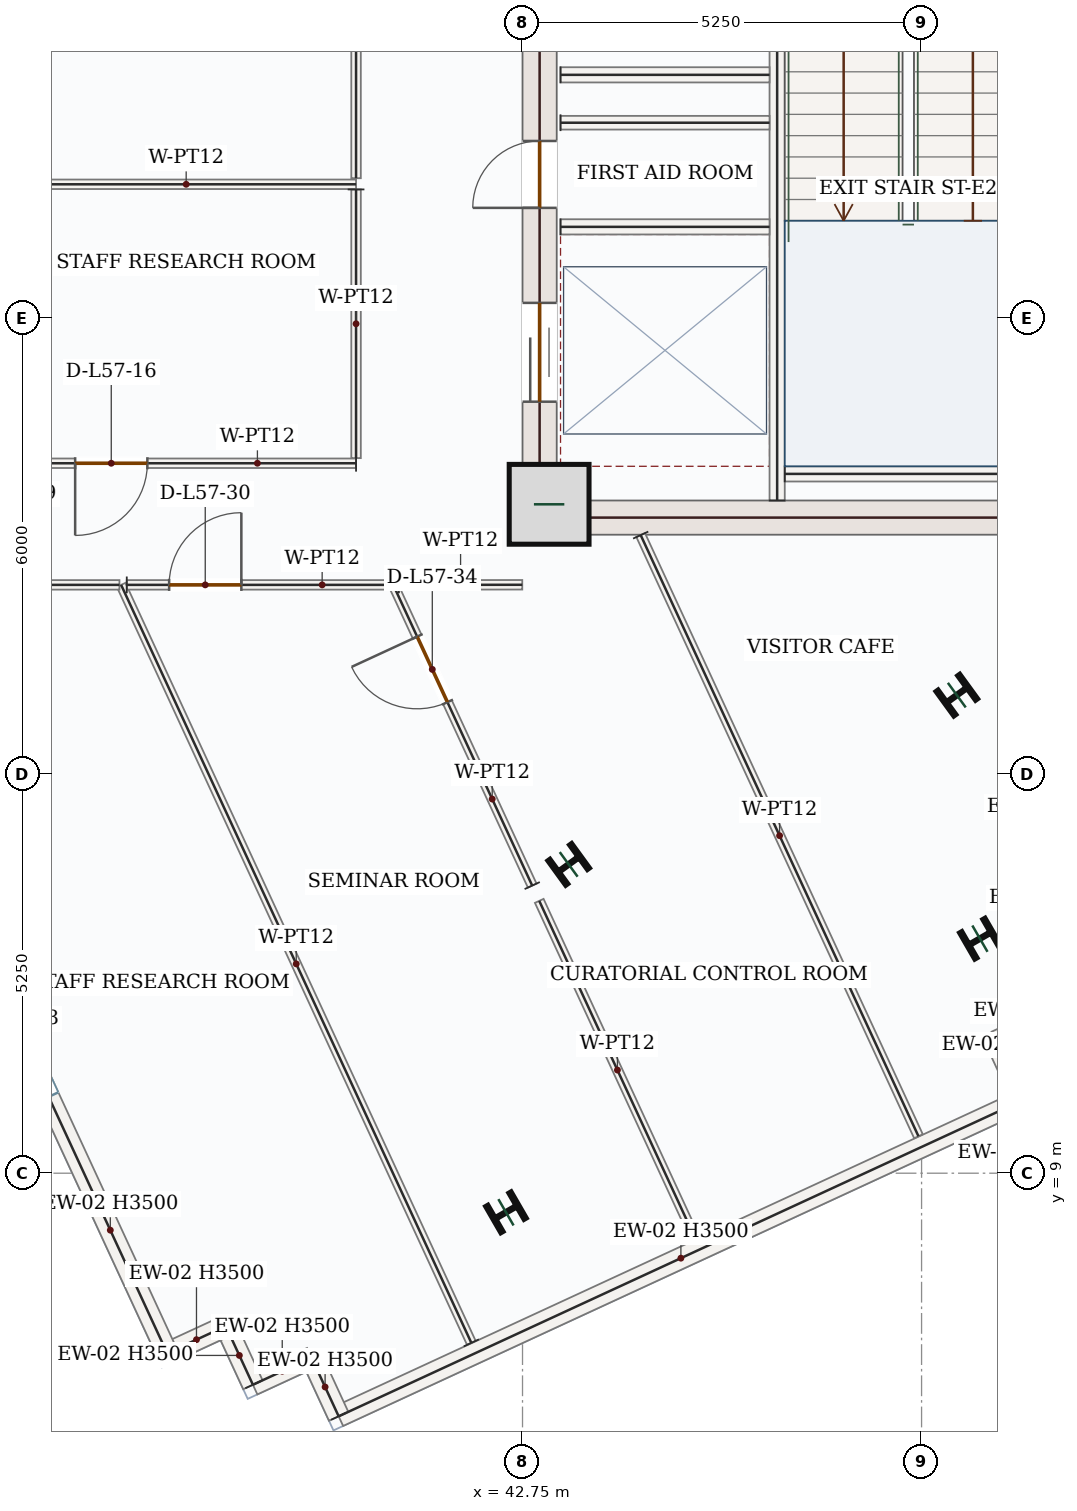
"""IFC4 building model, lengths in metres.
Left out: names, types, materials, properties, quantities, classifications, styles, units other than length and angle.
Written with IfcOpenShell. Run it as: python <this file> out.ifc"""

import sys

from ifc_helpers import new_model, si_unit, direction, frame, frame_2d, origin, origin_2d, place, context, subcontext, project, spatial, rectangle, i_section, extrude, source, transform, mapped, element, fill, save


model = new_model("IFC4")
c1 = context("Model", 3, precision=1e-05, world=origin(), true_north=direction((0.0, 1.0)))
c2 = subcontext(c1, "Body", "Model", "MODEL_VIEW")
j1 = project(units=[si_unit("LENGTHUNIT", "METRE"), si_unit("PLANEANGLEUNIT", "RADIAN")], contexts=[c1])
p1 = place(None, origin())
s1 = spatial("IfcSite", under=j1, at=p1, CompositionType="ELEMENT")
p2 = place(p1, origin())
s2 = spatial("IfcBuilding", under=s1, at=p2, CompositionType="ELEMENT")
p3 = place(p2, frame((0.0, 0.0, 242.85)))
s3 = spatial("IfcBuildingStorey", under=s2, at=p3, CompositionType="ELEMENT", Elevation=242.85)
p4 = place(p3, frame((42.975, 17.4, 0.0), z_axis=(0.0, 0.0, 1.0), x_axis=(0.0, 1.0, 0.0)))
e1 = element("IfcWall", 1, at=p4, inside=s3, PredefinedType="SHEAR", context=c2, shape_type="SweptSolid", body=[
    extrude(rectangle(XDim=8.55, YDim=0.45, at=frame_2d((4.275, 0.0))), origin(), (0.0, 0.0, 1.0), 3.5),
])
p5 = place(p4, frame((6.65, 0.0, 0.0)))
e2 = element("IfcOpeningElement", 2, at=p5, cuts=e1, PredefinedType="OPENING", context=c2, shape_type="SweptSolid", body=[
    extrude(rectangle(XDim=1.1, YDim=2.2, at=frame_2d((0.55, 1.1))), frame((0.0, 0.235, 0.0), z_axis=(0.0, -1.0, 0.0), x_axis=(1.0, 0.0, 0.0)), (0.0, 0.0, 1.0), 0.47),
])
p6 = place(p4, frame((1.75, 0.0, 0.0)))
e3 = element("IfcOpeningElement", 3, at=p6, cuts=e1, PredefinedType="OPENING", context=c2, shape_type="SweptSolid", body=[
    extrude(rectangle(XDim=1.3, YDim=2.2, at=frame_2d((0.65, 1.1))), frame((0.0, 0.235, 0.0), z_axis=(0.0, -1.0, 0.0), x_axis=(1.0, 0.0, 0.0)), (0.0, 0.0, 1.0), 0.47),
])
p7 = place(p4, frame((4.3, 0.0, 0.0)))
e4 = element("IfcOpeningElement", 4, at=p7, cuts=e1, PredefinedType="OPENING", context=c2, shape_type="SweptSolid", body=[
    extrude(rectangle(XDim=0.88, YDim=2.1, at=frame_2d((0.44, 1.05))), frame((0.0, 0.235, 0.0), z_axis=(0.0, -1.0, 0.0), x_axis=(1.0, 0.0, 0.0)), (0.0, 0.0, 1.0), 0.47),
])
m1 = source(origin(), c2, "Body", "SweptSolid", [
    extrude(rectangle(XDim=7.1, YDim=0.45, at=frame_2d((3.55, 0.0))), origin(), (0.0, 0.0, 1.0), 3.5),
])
p8 = place(p3, frame((43.2, 17.625, 0.0), z_axis=(0.0, 0.0, 1.0), x_axis=(1.0, 0.0, 0.0)))
e5 = element("IfcWall", 5, at=p8, inside=s3, PredefinedType="SHEAR", context=c2, shape_type="MappedRepresentation", body=[
    mapped(m1, transform((0.0, 0.0, 0.0), x_axis=(1.0, 0.0, 0.0), y_axis=(0.0, 1.0, 0.0), z_axis=(0.0, 0.0, 1.0), scale=1.0)),
])
m2 = source(origin(), c2, "Body", "SweptSolid", [
    extrude(rectangle(XDim=1.05, YDim=1.05, at=origin_2d()), origin(), (0.0, 0.0, 1.0), 3.75),
])
p9 = place(p3, frame((43.1, 17.8, 0.0), z_axis=(0.0, 0.0, 1.0), x_axis=(1.0, 0.0, 0.0)))
e6 = element("IfcColumn", 6, at=p9, inside=s3, PredefinedType="COLUMN", context=c2, shape_type="MappedRepresentation", body=[
    mapped(m2, transform((0.0, 0.0, 0.0), x_axis=(1.0, 0.0, 0.0), y_axis=(0.0, 1.0, 0.0), z_axis=(0.0, 0.0, 1.0), scale=1.0)),
])
m3 = source(origin(), c2, "Body", "SweptSolid", [
    extrude(i_section(OverallWidth=0.399, OverallDepth=0.386, WebThickness=0.021, FlangeThickness=0.033, FilletRadius=0.018, at=origin_2d()), origin(), (0.0, 0.0, 1.0), 3.75),
])
for number, where, z_axis, x_axis in (
    (7, (43.357, 13.063, 0.0), (0.0, 0.0, 1.0), (-0.588, 0.809, 0.0)),
    (8, (48.464, 15.289, 0.0), (0.0, 0.0, 1.0), (-0.588, 0.809, 0.0)),
    (9, (42.532, 8.486, 0.0), (0.0, 0.0, 1.0), (-0.5, 0.866, 0.0)),
    (10, (48.768, 12.086, 0.0), (0.0, 0.0, 1.0), (-0.5, 0.866, 0.0)),
):
    element("IfcColumn", number, at=place(p3, frame(where, z_axis=z_axis, x_axis=x_axis)), inside=s3, PredefinedType="COLUMN", context=c2, shape_type="MappedRepresentation", body=[
        mapped(m3, transform((0.0, 0.0, 0.0), x_axis=(1.0, 0.0, 0.0), y_axis=(0.0, 1.0, 0.0), z_axis=(0.0, 0.0, 1.0), scale=1.0)),
    ])
m4 = source(origin(), c2, "Body", "SweptSolid", [
    extrude(rectangle(XDim=0.85, YDim=0.28, at=frame_2d((0.425, 0.0))), origin(), (0.0, 0.0, 1.0), 3.5),
])
p10 = place(p3, frame((49.751, 11.091, 0.0), z_axis=(0.0, 0.0, 1.0), x_axis=(-0.907791150023, -0.419422493365, 0.0)))
e11 = element("IfcWall", 11, at=p10, inside=s3, PredefinedType="SOLIDWALL", context=c2, shape_type="MappedRepresentation", body=[
    mapped(m4, transform((0.0, 0.0, 0.0), x_axis=(1.0, 0.0, 0.0), y_axis=(0.0, 1.0, 0.0), z_axis=(0.0, 0.0, 1.0), scale=1.0)),
])
m5 = source(origin(), c2, "Body", "SweptSolid", [
    extrude(rectangle(XDim=0.85, YDim=0.28, at=frame_2d((0.425, 0.0))), origin(), (0.0, 0.0, 1.0), 3.5),
])
p11 = place(p3, frame((48.98, 10.734, 0.0), z_axis=(0.0, 0.0, 1.0), x_axis=(0.419313139191, -0.907841666427, 0.0)))
e12 = element("IfcWall", 12, at=p11, inside=s3, PredefinedType="SOLIDWALL", context=c2, shape_type="MappedRepresentation", body=[
    mapped(m5, transform((0.0, 0.0, 0.0), x_axis=(1.0, 0.0, 0.0), y_axis=(0.0, 1.0, 0.0), z_axis=(0.0, 0.0, 1.0), scale=1.0)),
])
m6 = source(origin(), c2, "Body", "SweptSolid", [
    extrude(rectangle(XDim=9.92, YDim=0.28, at=frame_2d((4.96, 0.0))), origin(), (0.0, 0.0, 1.0), 3.5),
])
p12 = place(p3, frame((49.336, 9.963, 0.0), z_axis=(0.0, 0.0, 1.0), x_axis=(-0.907779940536, -0.419446754143, 0.0)))
e13 = element("IfcWall", 13, at=p12, inside=s3, PredefinedType="SOLIDWALL", context=c2, shape_type="MappedRepresentation", body=[
    mapped(m6, transform((0.0, 0.0, 0.0), x_axis=(1.0, 0.0, 0.0), y_axis=(0.0, 1.0, 0.0), z_axis=(0.0, 0.0, 1.0), scale=1.0)),
])
p13 = place(p3, frame((40.331, 5.802, 0.0), z_axis=(0.0, 0.0, 1.0), x_axis=(-0.419422493365, 0.907791150023, 0.0)))
e14 = element("IfcWall", 14, at=p13, inside=s3, PredefinedType="SOLIDWALL", context=c2, shape_type="MappedRepresentation", body=[
    mapped(m4, transform((0.0, 0.0, 0.0), x_axis=(1.0, 0.0, 0.0), y_axis=(0.0, 1.0, 0.0), z_axis=(0.0, 0.0, 1.0), scale=1.0)),
])
p14 = place(p3, frame((39.975, 6.573, 0.0), z_axis=(0.0, 0.0, 1.0), x_axis=(-0.907841666427, -0.419313139191, 0.0)))
e15 = element("IfcWall", 15, at=p14, inside=s3, PredefinedType="SOLIDWALL", context=c2, shape_type="MappedRepresentation", body=[
    mapped(m5, transform((0.0, 0.0, 0.0), x_axis=(1.0, 0.0, 0.0), y_axis=(0.0, 1.0, 0.0), z_axis=(0.0, 0.0, 1.0), scale=1.0)),
])
p15 = place(p3, frame((39.203, 6.217, 0.0), z_axis=(0.0, 0.0, 1.0), x_axis=(-0.419422493365, 0.907791150023, 0.0)))
e16 = element("IfcWall", 16, at=p15, inside=s3, PredefinedType="SOLIDWALL", context=c2, shape_type="MappedRepresentation", body=[
    mapped(m4, transform((0.0, 0.0, 0.0), x_axis=(1.0, 0.0, 0.0), y_axis=(0.0, 1.0, 0.0), z_axis=(0.0, 0.0, 1.0), scale=1.0)),
])
p16 = place(p3, frame((38.846, 6.988, 0.0), z_axis=(0.0, 0.0, 1.0), x_axis=(-0.907841666427, -0.419313139191, 0.0)))
e17 = element("IfcWall", 17, at=p16, inside=s3, PredefinedType="SOLIDWALL", context=c2, shape_type="MappedRepresentation", body=[
    mapped(m5, transform((0.0, 0.0, 0.0), x_axis=(1.0, 0.0, 0.0), y_axis=(0.0, 1.0, 0.0), z_axis=(0.0, 0.0, 1.0), scale=1.0)),
])
p17 = place(p3, frame((38.075, 6.632, 0.0), z_axis=(0.0, 0.0, 1.0), x_axis=(-0.419437747849, 0.90778410191, 0.0)))
e18 = element("IfcWall", 18, at=p17, inside=s3, PredefinedType="SOLIDWALL", context=c2, shape_type="SweptSolid", body=[
    extrude(rectangle(XDim=8.932, YDim=0.28, at=frame_2d((4.466, 0.0))), origin(), (0.0, 0.0, 1.0), 3.5),
])
p18 = place(p17, frame((3.716, 0.0, 0.85)))
e19 = element("IfcOpeningElement", 19, at=p18, cuts=e18, PredefinedType="OPENING", context=c2, shape_type="SweptSolid", body=[
    extrude(rectangle(XDim=1.5, YDim=1.5, at=frame_2d((0.75, 0.75))), frame((0.0, 0.15, 0.0), z_axis=(0.0, -1.0, 0.0), x_axis=(1.0, 0.0, 0.0)), (0.0, 0.0, 1.0), 0.3),
])
p19 = place(p3, frame((46.1, 17.85, 0.0), z_axis=(0.0, 0.0, 1.0), x_axis=(0.0, 1.0, 0.0)))
e20 = element("IfcWall", 20, at=p19, inside=s3, PredefinedType="SOLIDWALL", context=c2, shape_type="SweptSolid", body=[
    extrude(rectangle(XDim=8.0, YDim=0.2, at=frame_2d((4.0, 0.0))), origin(), (0.0, 0.0, 1.0), 3.5),
])
p20 = place(p19, frame((6.3, 0.0, 0.0)))
e21 = element("IfcOpeningElement", 21, at=p20, cuts=e20, PredefinedType="OPENING", context=c2, shape_type="SweptSolid", body=[
    extrude(rectangle(XDim=1.05, YDim=2.15, at=frame_2d((0.525, 1.075))), frame((0.0, 0.11, 0.0), z_axis=(0.0, -1.0, 0.0), x_axis=(1.0, 0.0, 0.0)), (0.0, 0.0, 1.0), 0.22),
])
m7 = source(origin(), c2, "Body", "SweptSolid", [
    extrude(rectangle(XDim=3.25, YDim=0.2, at=frame_2d((1.625, 0.0))), origin(), (0.0, 0.0, 1.0), 3.5),
])
p21 = place(p3, frame((46.2, 18.2, 0.0), z_axis=(0.0, 0.0, 1.0), x_axis=(1.0, 0.0, 0.0)))
e22 = element("IfcWall", 22, at=p21, inside=s3, PredefinedType="SOLIDWALL", context=c2, shape_type="MappedRepresentation", body=[
    mapped(m7, transform((0.0, 0.0, 0.0), x_axis=(1.0, 0.0, 0.0), y_axis=(0.0, 1.0, 0.0), z_axis=(0.0, 0.0, 1.0), scale=1.0)),
])
m8 = source(origin(), c2, "Body", "SweptSolid", [
    extrude(rectangle(XDim=2.75, YDim=0.2, at=frame_2d((1.375, 0.0))), origin(), (0.0, 0.0, 1.0), 3.5),
])
for number, where, z_axis, x_axis in (
    (23, (43.25, 23.45, 0.0), (0.0, 0.0, 1.0), (1.0, 0.0, 0.0)),
    (24, (43.25, 21.45, 0.0), (0.0, 0.0, 1.0), (1.0, 0.0, 0.0)),
):
    element("IfcWall", number, at=place(p3, frame(where, z_axis=z_axis, x_axis=x_axis)), inside=s3, PredefinedType="SOLIDWALL", context=c2, shape_type="MappedRepresentation", body=[
        mapped(m8, transform((0.0, 0.0, 0.0), x_axis=(1.0, 0.0, 0.0), y_axis=(0.0, 1.0, 0.0), z_axis=(0.0, 0.0, 1.0), scale=1.0)),
    ])
m9 = source(origin(), c2, "Body", "SweptSolid", [
    extrude(rectangle(XDim=2.75, YDim=0.18, at=frame_2d((1.375, 0.0))), origin(), (0.0, 0.0, 1.0), 3.5),
])
p22 = place(p3, frame((43.25, 22.82, 0.0), z_axis=(0.0, 0.0, 1.0), x_axis=(1.0, 0.0, 0.0)))
e25 = element("IfcWall", 25, at=p22, inside=s3, PredefinedType="PARTITIONING", context=c2, shape_type="MappedRepresentation", body=[
    mapped(m9, transform((0.0, 0.0, 0.0), x_axis=(1.0, 0.0, 0.0), y_axis=(0.0, 1.0, 0.0), z_axis=(0.0, 0.0, 1.0), scale=1.0)),
])
p23 = place(p3, frame((40.56, 18.34, 0.0), z_axis=(0.0, 0.0, 1.0), x_axis=(-1.0, 0.0, 0.0)))
e26 = element("IfcWall", 26, at=p23, inside=s3, PredefinedType="PARTITIONING", context=c2, shape_type="SweptSolid", body=[
    extrude(rectangle(XDim=4.47, YDim=0.125, at=frame_2d((2.235, 0.0))), origin(), (0.0, 0.0, 1.0), 3.5),
])
p24 = place(p23, frame((2.746, 0.0, 0.0)))
e27 = element("IfcOpeningElement", 27, at=p24, cuts=e26, PredefinedType="OPENING", context=c2, shape_type="SweptSolid", body=[
    extrude(rectangle(XDim=0.95, YDim=2.15, at=frame_2d((0.475, 1.075))), frame((0.0, 0.073, 0.0), z_axis=(0.0, -1.0, 0.0), x_axis=(1.0, 0.0, 0.0)), (0.0, 0.0, 1.0), 0.145),
])
m10 = source(origin(), c2, "Body", "SweptSolid", [
    extrude(rectangle(XDim=4.47, YDim=0.125, at=frame_2d((2.235, 0.0))), origin(), (0.0, 0.0, 1.0), 3.5),
])
p25 = place(p3, frame((36.09, 22.01, 0.0), z_axis=(0.0, 0.0, 1.0), x_axis=(1.0, 0.0, 0.0)))
e28 = element("IfcWall", 28, at=p25, inside=s3, PredefinedType="PARTITIONING", context=c2, shape_type="MappedRepresentation", body=[
    mapped(m10, transform((0.0, 0.0, 0.0), x_axis=(1.0, 0.0, 0.0), y_axis=(0.0, 1.0, 0.0), z_axis=(0.0, 0.0, 1.0), scale=1.0)),
])
m11 = source(origin(), c2, "Body", "SweptSolid", [
    extrude(rectangle(XDim=3.535, YDim=0.125, at=frame_2d((1.768, 0.0))), origin(), (0.0, 0.0, 1.0), 3.5),
])
p26 = place(p3, frame((40.56, 21.942, 0.0), z_axis=(0.0, 0.0, 1.0), x_axis=(0.0, -1.0, 0.0)))
e29 = element("IfcWall", 29, at=p26, inside=s3, PredefinedType="PARTITIONING", context=c2, shape_type="MappedRepresentation", body=[
    mapped(m11, transform((0.0, 0.0, 0.0), x_axis=(1.0, 0.0, 0.0), y_axis=(0.0, 1.0, 0.0), z_axis=(0.0, 0.0, 1.0), scale=1.0)),
])
m12 = source(origin(), c2, "Body", "SweptSolid", [
    extrude(rectangle(XDim=3.652, YDim=0.125, at=frame_2d((1.826, 0.0))), origin(), (0.0, 0.0, 1.0), 3.5),
])
p27 = place(p3, frame((40.56, 25.742, 0.0), z_axis=(0.0, 0.0, 1.0), x_axis=(0.0, -1.0, 0.0)))
e30 = element("IfcWall", 30, at=p27, inside=s3, PredefinedType="PARTITIONING", context=c2, shape_type="MappedRepresentation", body=[
    mapped(m12, transform((0.0, 0.0, 0.0), x_axis=(1.0, 0.0, 0.0), y_axis=(0.0, 1.0, 0.0), z_axis=(0.0, 0.0, 1.0), scale=1.0)),
])
m13 = source(origin(), c2, "Body", "SweptSolid", [
    extrude(rectangle(XDim=4.904, YDim=0.125, at=frame_2d((2.452, 0.0))), origin(), (0.0, 0.0, 1.0), 3.5),
])
p28 = place(p3, frame((45.027, 8.131, 0.0), z_axis=(0.0, 0.0, 1.0), x_axis=(-0.419459107568, 0.907774232438, 0.0)))
e31 = element("IfcWall", 31, at=p28, inside=s3, PredefinedType="PARTITIONING", context=c2, shape_type="MappedRepresentation", body=[
    mapped(m13, transform((0.0, 0.0, 0.0), x_axis=(1.0, 0.0, 0.0), y_axis=(0.0, 1.0, 0.0), z_axis=(0.0, 0.0, 1.0), scale=1.0)),
])
p29 = place(p3, frame((42.877, 12.784, 0.0), z_axis=(0.0, 0.0, 1.0), x_axis=(-0.419416941906, 0.907793714917, 0.0)))
e32 = element("IfcWall", 32, at=p29, inside=s3, PredefinedType="PARTITIONING", context=c2, shape_type="SweptSolid", body=[
    extrude(rectangle(XDim=4.358, YDim=0.125, at=frame_2d((2.179, 0.0))), origin(), (0.0, 0.0, 1.0), 3.5),
])
p30 = place(p29, frame((2.658, 0.0, 0.0)))
e33 = element("IfcOpeningElement", 33, at=p30, cuts=e32, PredefinedType="OPENING", context=c2, shape_type="SweptSolid", body=[
    extrude(rectangle(XDim=0.95, YDim=2.15, at=frame_2d((0.475, 1.075))), frame((0.0, 0.073, 0.0), z_axis=(0.0, -1.0, 0.0), x_axis=(1.0, 0.0, 0.0)), (0.0, 0.0, 1.0), 0.145),
])
m14 = source(origin(), c2, "Body", "SweptSolid", [
    extrude(rectangle(XDim=1.623, YDim=0.125, at=frame_2d((0.812, 0.0))), origin(), (0.0, 0.0, 1.0), 3.5),
])
p31 = place(p3, frame((41.124, 16.74, 0.0), z_axis=(0.0, 0.0, 1.0), x_axis=(0.999999717168, 0.000752105684, 0.0)))
e34 = element("IfcWall", 34, at=p31, inside=s3, PredefinedType="PARTITIONING", context=c2, shape_type="MappedRepresentation", body=[
    mapped(m14, transform((0.0, 0.0, 0.0), x_axis=(1.0, 0.0, 0.0), y_axis=(0.0, 1.0, 0.0), z_axis=(0.0, 0.0, 1.0), scale=1.0)),
])
m15 = source(origin(), c2, "Body", "SweptSolid", [
    extrude(rectangle(XDim=8.712, YDim=0.125, at=frame_2d((4.356, 0.0))), origin(), (0.0, 0.0, 1.0), 3.5),
])
p32 = place(p3, frame((44.305, 17.395, 0.0), z_axis=(0.0, 0.0, 1.0), x_axis=(0.419438424399, -0.907783789312, 0.0)))
e35 = element("IfcWall", 35, at=p32, inside=s3, PredefinedType="PARTITIONING", context=c2, shape_type="MappedRepresentation", body=[
    mapped(m15, transform((0.0, 0.0, 0.0), x_axis=(1.0, 0.0, 0.0), y_axis=(0.0, 1.0, 0.0), z_axis=(0.0, 0.0, 1.0), scale=1.0)),
])
m16 = source(origin(), c2, "Body", "SweptSolid", [
    extrude(rectangle(XDim=10.985, YDim=0.125, at=frame_2d((5.492, 0.0))), origin(), (0.0, 0.0, 1.0), 3.5),
])
p33 = place(p3, frame((42.077, 6.768, 0.0), z_axis=(0.0, 0.0, 1.0), x_axis=(-0.41945135704, 0.907777813717, 0.0)))
e36 = element("IfcWall", 36, at=p33, inside=s3, PredefinedType="PARTITIONING", context=c2, shape_type="MappedRepresentation", body=[
    mapped(m16, transform((0.0, 0.0, 0.0), x_axis=(1.0, 0.0, 0.0), y_axis=(0.0, 1.0, 0.0), z_axis=(0.0, 0.0, 1.0), scale=1.0)),
])
p34 = place(p3, frame((37.543, 16.74, 0.0), z_axis=(0.0, 0.0, 1.0), x_axis=(1.0, 0.0, 0.0)))
e37 = element("IfcWall", 37, at=p34, inside=s3, PredefinedType="PARTITIONING", context=c2, shape_type="SweptSolid", body=[
    extrude(rectangle(XDim=3.484, YDim=0.125, at=frame_2d((1.742, 0.0))), origin(), (0.0, 0.0, 1.0), 3.5),
])
p35 = place(p34, frame((0.557, 0.0, 0.0)))
e38 = element("IfcOpeningElement", 38, at=p35, cuts=e37, PredefinedType="OPENING", context=c2, shape_type="SweptSolid", body=[
    extrude(rectangle(XDim=0.95, YDim=2.15, at=frame_2d((0.475, 1.075))), frame((0.0, 0.073, 0.0), z_axis=(0.0, -1.0, 0.0), x_axis=(1.0, 0.0, 0.0)), (0.0, 0.0, 1.0), 0.145),
])
p36 = place(p3, frame((32.211, 16.74, 0.0), z_axis=(0.0, 0.0, 1.0), x_axis=(1.0, 0.0, 0.0)))
e39 = element("IfcWall", 39, at=p36, inside=s3, PredefinedType="PARTITIONING", context=c2, shape_type="SweptSolid", body=[
    extrude(rectangle(XDim=5.236, YDim=0.125, at=frame_2d((2.618, 0.0))), origin(), (0.0, 0.0, 1.0), 3.5),
])
p37 = place(p36, frame((3.343, 0.0, 0.0)))
e40 = element("IfcOpeningElement", 40, at=p37, cuts=e39, PredefinedType="OPENING", context=c2, shape_type="SweptSolid", body=[
    extrude(rectangle(XDim=0.95, YDim=2.15, at=frame_2d((0.475, 1.075))), frame((0.0, 0.073, 0.0), z_axis=(0.0, -1.0, 0.0), x_axis=(1.0, 0.0, 0.0)), (0.0, 0.0, 1.0), 0.145),
])
m17 = source(origin(), c2, "Body", "SweptSolid", [
    extrude(rectangle(XDim=1.3, YDim=2.2, at=frame_2d((0.65, 1.1))), frame((0.0, 0.025, 0.0), z_axis=(0.0, -1.0, 0.0), x_axis=(1.0, 0.0, 0.0)), (0.0, 0.0, 1.0), 0.05),
])
p38 = place(p6, origin())
e41 = element("IfcDoor", 41, at=p38, inside=s3, OperationType="DOUBLE_DOOR_SLIDING", PredefinedType="DOOR", context=c2, shape_type="MappedRepresentation", body=[
    mapped(m17, transform((0.0, 0.0, 0.0), x_axis=(1.0, 0.0, 0.0), y_axis=(0.0, 1.0, 0.0), z_axis=(0.0, 0.0, 1.0), scale=1.0)),
])
fill(e3, e41)
m18 = source(origin(), c2, "Body", "SweptSolid", [
    extrude(rectangle(XDim=0.88, YDim=2.1, at=frame_2d((0.44, 1.05))), frame((0.0, 0.025, 0.0), z_axis=(0.0, -1.0, 0.0), x_axis=(1.0, 0.0, 0.0)), (0.0, 0.0, 1.0), 0.05),
])
p39 = place(p7, origin())
e42 = element("IfcDoor", 42, at=p39, inside=s3, OperationType="SINGLE_SWING_LEFT", PredefinedType="DOOR", context=c2, shape_type="MappedRepresentation", body=[
    mapped(m18, transform((0.0, 0.0, 0.0), x_axis=(1.0, 0.0, 0.0), y_axis=(0.0, 1.0, 0.0), z_axis=(0.0, 0.0, 1.0), scale=1.0)),
])
fill(e4, e42)
m19 = source(origin(), c2, "Body", "SweptSolid", [
    extrude(rectangle(XDim=0.95, YDim=2.15, at=frame_2d((0.475, 1.075))), frame((0.0, 0.025, 0.0), z_axis=(0.0, -1.0, 0.0), x_axis=(1.0, 0.0, 0.0)), (0.0, 0.0, 1.0), 0.05),
])
p40 = place(p24, origin())
e43 = element("IfcDoor", 43, at=p40, inside=s3, OperationType="SINGLE_SWING_RIGHT", PredefinedType="DOOR", context=c2, shape_type="MappedRepresentation", body=[
    mapped(m19, transform((0.0, 0.0, 0.0), x_axis=(1.0, 0.0, 0.0), y_axis=(0.0, 1.0, 0.0), z_axis=(0.0, 0.0, 1.0), scale=1.0)),
])
fill(e27, e43)
p41 = place(p35, origin())
e44 = element("IfcDoor", 44, at=p41, inside=s3, OperationType="SINGLE_SWING_RIGHT", PredefinedType="DOOR", context=c2, shape_type="MappedRepresentation", body=[
    mapped(m19, transform((0.0, 0.0, 0.0), x_axis=(1.0, 0.0, 0.0), y_axis=(0.0, 1.0, 0.0), z_axis=(0.0, 0.0, 1.0), scale=1.0)),
])
fill(e38, e44)
p42 = place(p30, origin())
e45 = element("IfcDoor", 45, at=p42, inside=s3, OperationType="SINGLE_SWING_RIGHT", PredefinedType="DOOR", context=c2, shape_type="MappedRepresentation", body=[
    mapped(m19, transform((0.0, 0.0, 0.0), x_axis=(1.0, 0.0, 0.0), y_axis=(0.0, 1.0, 0.0), z_axis=(0.0, 0.0, 1.0), scale=1.0)),
])
fill(e33, e45)
save(model, sys.argv[1])
